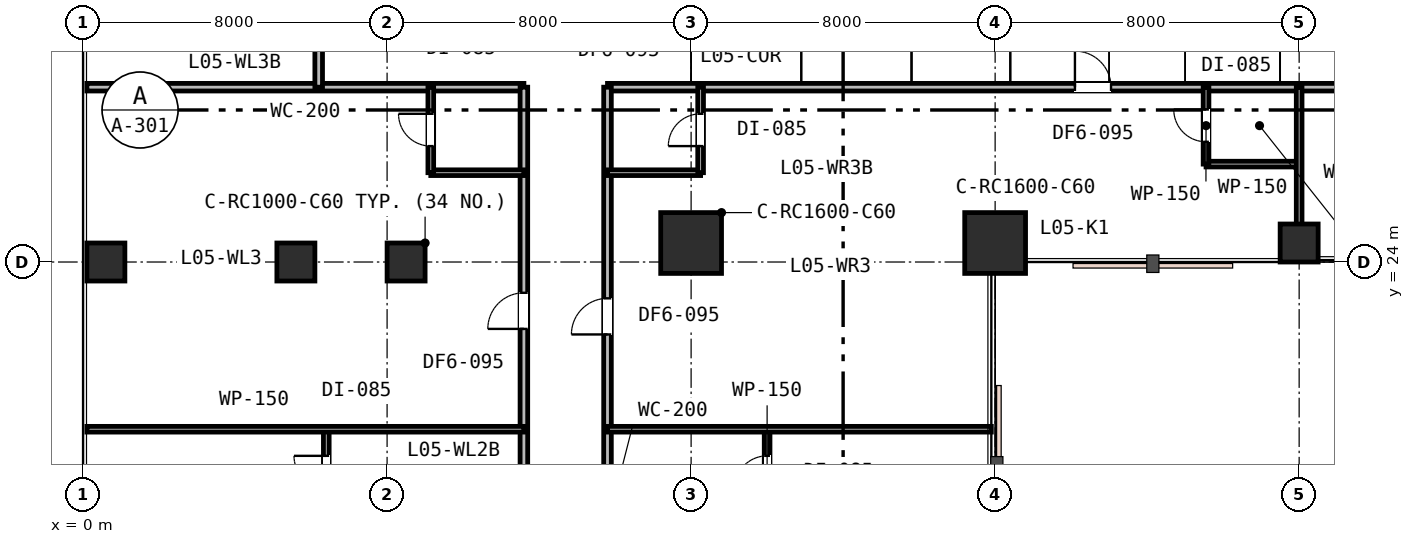
"""IFC4 building model, lengths in metres.
Left out: names, types, materials, properties, quantities, classifications, styles, units other than length and angle.
Written with IfcOpenShell. Run it as: python <this file> out.ifc"""

import sys

from ifc_helpers import new_model, si_unit, direction, frame, frame_2d, origin, origin_2d, place, context, subcontext, project, spatial, rectangle, extrude, element, fill, save


model = new_model("IFC4")
c1 = context("Model", 3, precision=1e-05, world=origin(), true_north=direction((0.0, 1.0)))
c2 = subcontext(c1, "Body", "Model", "MODEL_VIEW")
j1 = project(units=[si_unit("LENGTHUNIT", "METRE"), si_unit("PLANEANGLEUNIT", "RADIAN")], contexts=[c1])
p1 = place(None, origin())
s1 = spatial("IfcSite", under=j1, at=p1, CompositionType="ELEMENT")
p2 = place(p1, origin())
s2 = spatial("IfcBuilding", under=s1, at=p2, CompositionType="ELEMENT")
p3 = place(p2, frame((0.0, 0.0, 25.8)))
s3 = spatial("IfcBuildingStorey", under=s2, at=p3, CompositionType="ELEMENT", Elevation=25.8)
p4 = place(p3, frame((8.5, 24.0, 0.0), z_axis=(0.0, 0.0, 1.0), x_axis=(1.0, 0.0, 0.0)))
e1 = element("IfcColumn", 1, at=p4, inside=s3, PredefinedType="COLUMN", context=c2, shape_type="SweptSolid", body=[
    extrude(rectangle(XDim=1.0, YDim=1.0, at=origin_2d()), origin(), (0.0, 0.0, 1.0), 3.6),
])
for number, where, z_axis, x_axis in (
    (2, (16.0, 24.5, 0.0), (0.0, 0.0, 1.0), (1.0, 0.0, 0.0)),
    (3, (24.0, 24.5, 0.0), (0.0, 0.0, 1.0), (1.0, 0.0, 0.0)),
):
    element("IfcColumn", number, at=place(p3, frame(where, z_axis=z_axis, x_axis=x_axis)), inside=s3, PredefinedType="COLUMN", context=c2, shape_type="SweptSolid", body=[
        extrude(rectangle(XDim=1.6, YDim=1.6, at=origin_2d()), origin(), (0.0, 0.0, 1.0), 3.6),
    ])
for number, where, z_axis, x_axis in (
    (4, (32.0, 24.5, 0.0), (0.0, 0.0, 1.0), (1.0, 0.0, 0.0)),
    (5, (5.6, 24.0, 0.0), (0.0, 0.0, 1.0), (1.0, 0.0, 0.0)),
    (6, (0.6, 24.0, 0.0), (0.0, 0.0, 1.0), (1.0, 0.0, 0.0)),
):
    element("IfcColumn", number, at=place(p3, frame(where, z_axis=z_axis, x_axis=x_axis)), inside=s3, PredefinedType="COLUMN", context=c2, shape_type="SweptSolid", body=[
        extrude(rectangle(XDim=1.0, YDim=1.0, at=origin_2d()), origin(), (0.0, 0.0, 1.0), 3.6),
    ])
p5 = place(p3, frame((0.1, 28.6, 0.0), z_axis=(0.0, 0.0, 1.0), x_axis=(1.0, 0.0, 0.0)))
e7 = element("IfcWall", 7, at=p5, inside=s3, PredefinedType="PARTITIONING", context=c2, shape_type="SweptSolid", body=[
    extrude(rectangle(XDim=11.5, YDim=0.2, at=frame_2d((5.75, 0.0))), origin(), (0.0, 0.0, 1.0), 2.68),
])
p6 = place(p3, frame((13.8, 28.6, 0.0), z_axis=(0.0, 0.0, 1.0), x_axis=(1.0, 0.0, 0.0)))
e8 = element("IfcWall", 8, at=p6, inside=s3, PredefinedType="PARTITIONING", context=c2, shape_type="SweptSolid", body=[
    extrude(rectangle(XDim=36.6, YDim=0.2, at=frame_2d((18.3, 0.0))), origin(), (0.0, 0.0, 1.0), 2.68),
])
p7 = place(p6, frame((12.3, 0.0, 0.0)))
e9 = element("IfcOpeningElement", 9, at=p7, cuts=e8, PredefinedType="OPENING", context=c2, shape_type="SweptSolid", body=[
    extrude(rectangle(XDim=0.95, YDim=2.15, at=frame_2d((0.475, 1.075))), frame((0.0, 0.11, 0.0), z_axis=(0.0, -1.0, 0.0), x_axis=(1.0, 0.0, 0.0)), (0.0, 0.0, 1.0), 0.22),
])
p8 = place(p6, frame((20.075, 0.0, 0.0)))
e10 = element("IfcOpeningElement", 10, at=p8, cuts=e8, PredefinedType="OPENING", context=c2, shape_type="SweptSolid", body=[
    extrude(rectangle(XDim=0.95, YDim=2.15, at=frame_2d((0.475, 1.075))), frame((0.0, 0.11, 0.0), z_axis=(0.0, -1.0, 0.0), x_axis=(1.0, 0.0, 0.0)), (0.0, 0.0, 1.0), 0.22),
])
p9 = place(p6, frame((26.829, 0.0, 0.0)))
e11 = element("IfcOpeningElement", 11, at=p9, cuts=e8, PredefinedType="OPENING", context=c2, shape_type="SweptSolid", body=[
    extrude(rectangle(XDim=0.95, YDim=2.15, at=frame_2d((0.475, 1.075))), frame((0.0, 0.11, 0.0), z_axis=(0.0, -1.0, 0.0), x_axis=(1.0, 0.0, 0.0)), (0.0, 0.0, 1.0), 0.22),
])
p10 = place(p6, frame((32.669, 0.0, 0.0)))
e12 = element("IfcOpeningElement", 12, at=p10, cuts=e8, PredefinedType="OPENING", context=c2, shape_type="SweptSolid", body=[
    extrude(rectangle(XDim=0.95, YDim=2.15, at=frame_2d((0.475, 1.075))), frame((0.0, 0.11, 0.0), z_axis=(0.0, -1.0, 0.0), x_axis=(1.0, 0.0, 0.0)), (0.0, 0.0, 1.0), 0.22),
])
p11 = place(p3, frame((6.2, 28.6, 0.0), z_axis=(0.0, 0.0, 1.0), x_axis=(0.0, 1.0, 0.0)))
e13 = element("IfcWall", 13, at=p11, inside=s3, PredefinedType="PARTITIONING", context=c2, shape_type="SweptSolid", body=[
    extrude(rectangle(XDim=12.4, YDim=0.2, at=frame_2d((6.2, 0.0))), origin(), (0.0, 0.0, 1.0), 2.68),
])
p12 = place(p11, frame((3.725, 0.0, 0.0)))
e14 = element("IfcOpeningElement", 14, at=p12, cuts=e13, PredefinedType="OPENING", context=c2, shape_type="SweptSolid", body=[
    extrude(rectangle(XDim=0.95, YDim=2.15, at=frame_2d((0.475, 1.075))), frame((0.0, 0.11, 0.0), z_axis=(0.0, -1.0, 0.0), x_axis=(1.0, 0.0, 0.0)), (0.0, 0.0, 1.0), 0.22),
])
p13 = place(p11, frame((8.91, 0.0, 0.0)))
e15 = element("IfcOpeningElement", 15, at=p13, cuts=e13, PredefinedType="OPENING", context=c2, shape_type="SweptSolid", body=[
    extrude(rectangle(XDim=0.95, YDim=2.15, at=frame_2d((0.475, 1.075))), frame((0.0, 0.11, 0.0), z_axis=(0.0, -1.0, 0.0), x_axis=(1.0, 0.0, 0.0)), (0.0, 0.0, 1.0), 0.22),
])
p14 = place(p3, frame((29.55, 26.576, 0.0), z_axis=(0.0, 0.0, 1.0), x_axis=(1.0, 0.0, 0.0)))
e16 = element("IfcWall", 16, at=p14, inside=s3, PredefinedType="PARTITIONING", context=c2, shape_type="SweptSolid", body=[
    extrude(rectangle(XDim=2.45, YDim=0.15, at=frame_2d((1.225, 0.0))), origin(), (0.0, 0.0, 1.0), 3.33),
])
p15 = place(p3, frame((29.55, 26.576, 0.0), z_axis=(0.0, 0.0, 1.0), x_axis=(0.0, 1.0, 0.0)))
e17 = element("IfcWall", 17, at=p15, inside=s3, PredefinedType="PARTITIONING", context=c2, shape_type="SweptSolid", body=[
    extrude(rectangle(XDim=2.024, YDim=0.15, at=frame_2d((1.012, 0.0))), origin(), (0.0, 0.0, 1.0), 3.33),
])
p16 = place(p15, frame((0.587, 0.0, 0.0)))
e18 = element("IfcOpeningElement", 18, at=p16, cuts=e17, PredefinedType="OPENING", context=c2, shape_type="SweptSolid", body=[
    extrude(rectangle(XDim=0.85, YDim=2.15, at=frame_2d((0.425, 1.075))), frame((0.0, 0.085, 0.0), z_axis=(0.0, -1.0, 0.0), x_axis=(1.0, 0.0, 0.0)), (0.0, 0.0, 1.0), 0.17),
])
p17 = place(p3, frame((32.0, 28.6, 0.0), z_axis=(0.0, 0.0, 1.0), x_axis=(0.0, -1.0, 0.0)))
e19 = element("IfcWall", 19, at=p17, inside=s3, PredefinedType="PARTITIONING", context=c2, shape_type="SweptSolid", body=[
    extrude(rectangle(XDim=4.5, YDim=0.15, at=frame_2d((2.25, 0.0))), origin(), (0.0, 0.0, 1.0), 2.87),
])
p18 = place(p3, frame((11.6, 5.6, 0.0), z_axis=(0.0, 0.0, 1.0), x_axis=(0.0, 1.0, 0.0)))
e20 = element("IfcWall", 20, at=p18, inside=s3, PredefinedType="PARTITIONING", context=c2, shape_type="SweptSolid", body=[
    extrude(rectangle(XDim=23.0, YDim=0.2, at=frame_2d((11.5, 0.0))), origin(), (0.0, 0.0, 1.0), 2.68),
])
p19 = place(p18, frame((2.19, 0.0, 0.0)))
e21 = element("IfcOpeningElement", 21, at=p19, cuts=e20, PredefinedType="OPENING", context=c2, shape_type="SweptSolid", body=[
    extrude(rectangle(XDim=0.95, YDim=2.15, at=frame_2d((0.475, 1.075))), frame((0.0, 0.11, 0.0), z_axis=(0.0, -1.0, 0.0), x_axis=(1.0, 0.0, 0.0)), (0.0, 0.0, 1.0), 0.22),
])
p20 = place(p18, frame((9.29, 0.0, 0.0)))
e22 = element("IfcOpeningElement", 22, at=p20, cuts=e20, PredefinedType="OPENING", context=c2, shape_type="SweptSolid", body=[
    extrude(rectangle(XDim=0.95, YDim=2.15, at=frame_2d((0.475, 1.075))), frame((0.0, 0.11, 0.0), z_axis=(0.0, -1.0, 0.0), x_axis=(1.0, 0.0, 0.0)), (0.0, 0.0, 1.0), 0.22),
])
p21 = place(p18, frame((16.64, 0.0, 0.0)))
e23 = element("IfcOpeningElement", 23, at=p21, cuts=e20, PredefinedType="OPENING", context=c2, shape_type="SweptSolid", body=[
    extrude(rectangle(XDim=0.95, YDim=2.15, at=frame_2d((0.475, 1.075))), frame((0.0, 0.11, 0.0), z_axis=(0.0, -1.0, 0.0), x_axis=(1.0, 0.0, 0.0)), (0.0, 0.0, 1.0), 0.22),
])
p22 = place(p3, frame((13.8, 5.6, 0.0), z_axis=(0.0, 0.0, 1.0), x_axis=(0.0, 1.0, 0.0)))
e24 = element("IfcWall", 24, at=p22, inside=s3, PredefinedType="PARTITIONING", context=c2, shape_type="SweptSolid", body=[
    extrude(rectangle(XDim=23.0, YDim=0.2, at=frame_2d((11.5, 0.0))), origin(), (0.0, 0.0, 1.0), 2.68),
])
p23 = place(p22, frame((0.752, 0.0, 0.0)))
e25 = element("IfcOpeningElement", 25, at=p23, cuts=e24, PredefinedType="OPENING", context=c2, shape_type="SweptSolid", body=[
    extrude(rectangle(XDim=0.95, YDim=2.15, at=frame_2d((0.475, 1.075))), frame((0.0, 0.11, 0.0), z_axis=(0.0, -1.0, 0.0), x_axis=(1.0, 0.0, 0.0)), (0.0, 0.0, 1.0), 0.22),
])
p24 = place(p22, frame((9.29, 0.0, 0.0)))
e26 = element("IfcOpeningElement", 26, at=p24, cuts=e24, PredefinedType="OPENING", context=c2, shape_type="SweptSolid", body=[
    extrude(rectangle(XDim=0.95, YDim=2.15, at=frame_2d((0.475, 1.075))), frame((0.0, 0.11, 0.0), z_axis=(0.0, -1.0, 0.0), x_axis=(1.0, 0.0, 0.0)), (0.0, 0.0, 1.0), 0.22),
])
p25 = place(p22, frame((16.494, 0.0, 0.0)))
e27 = element("IfcOpeningElement", 27, at=p25, cuts=e24, PredefinedType="OPENING", context=c2, shape_type="SweptSolid", body=[
    extrude(rectangle(XDim=0.95, YDim=2.15, at=frame_2d((0.475, 1.075))), frame((0.0, 0.11, 0.0), z_axis=(0.0, -1.0, 0.0), x_axis=(1.0, 0.0, 0.0)), (0.0, 0.0, 1.0), 0.22),
])
p26 = place(p3, frame((6.4, 17.35, 0.0), z_axis=(0.0, 0.0, 1.0), x_axis=(0.0, 1.0, 0.0)))
e28 = element("IfcWall", 28, at=p26, inside=s3, PredefinedType="PARTITIONING", context=c2, shape_type="SweptSolid", body=[
    extrude(rectangle(XDim=2.25, YDim=0.15, at=frame_2d((1.125, 0.0))), origin(), (0.0, 0.0, 1.0), 2.68),
])
p27 = place(p26, frame((0.7, 0.0, 0.0)))
e29 = element("IfcOpeningElement", 29, at=p27, cuts=e28, PredefinedType="OPENING", context=c2, shape_type="SweptSolid", body=[
    extrude(rectangle(XDim=0.85, YDim=2.15, at=frame_2d((0.425, 1.075))), frame((0.0, 0.085, 0.0), z_axis=(0.0, -1.0, 0.0), x_axis=(1.0, 0.0, 0.0)), (0.0, 0.0, 1.0), 0.17),
])
p28 = place(p3, frame((0.1, 19.6, 0.0), z_axis=(0.0, 0.0, 1.0), x_axis=(1.0, 0.0, 0.0)))
e30 = element("IfcWall", 30, at=p28, inside=s3, PredefinedType="PARTITIONING", context=c2, shape_type="SweptSolid", body=[
    extrude(rectangle(XDim=11.5, YDim=0.15, at=frame_2d((5.75, 0.0))), origin(), (0.0, 0.0, 1.0), 2.68),
])
p29 = place(p3, frame((18.0, 17.35, 0.0), z_axis=(0.0, 0.0, 1.0), x_axis=(0.0, 1.0, 0.0)))
e31 = element("IfcWall", 31, at=p29, inside=s3, PredefinedType="PARTITIONING", context=c2, shape_type="SweptSolid", body=[
    extrude(rectangle(XDim=2.25, YDim=0.15, at=frame_2d((1.125, 0.0))), origin(), (0.0, 0.0, 1.0), 2.68),
])
p30 = place(p29, frame((0.7, 0.0, 0.0)))
e32 = element("IfcOpeningElement", 32, at=p30, cuts=e31, PredefinedType="OPENING", context=c2, shape_type="SweptSolid", body=[
    extrude(rectangle(XDim=0.85, YDim=2.15, at=frame_2d((0.425, 1.075))), frame((0.0, 0.085, 0.0), z_axis=(0.0, -1.0, 0.0), x_axis=(1.0, 0.0, 0.0)), (0.0, 0.0, 1.0), 0.17),
])
p31 = place(p3, frame((13.8, 19.6, 0.0), z_axis=(0.0, 0.0, 1.0), x_axis=(1.0, 0.0, 0.0)))
e33 = element("IfcWall", 33, at=p31, inside=s3, PredefinedType="PARTITIONING", context=c2, shape_type="SweptSolid", body=[
    extrude(rectangle(XDim=10.1, YDim=0.15, at=frame_2d((5.05, 0.0))), origin(), (0.0, 0.0, 1.0), 2.68),
])
p32 = place(p3, frame((9.15, 26.35, 0.0), z_axis=(0.0, 0.0, 1.0), x_axis=(1.0, 0.0, 0.0)))
e34 = element("IfcWall", 34, at=p32, inside=s3, PredefinedType="PARTITIONING", context=c2, shape_type="SweptSolid", body=[
    extrude(rectangle(XDim=2.45, YDim=0.15, at=frame_2d((1.225, 0.0))), origin(), (0.0, 0.0, 1.0), 3.33),
])
p33 = place(p3, frame((9.15, 26.35, 0.0), z_axis=(0.0, 0.0, 1.0), x_axis=(0.0, 1.0, 0.0)))
e35 = element("IfcWall", 35, at=p33, inside=s3, PredefinedType="PARTITIONING", context=c2, shape_type="SweptSolid", body=[
    extrude(rectangle(XDim=2.25, YDim=0.15, at=frame_2d((1.125, 0.0))), origin(), (0.0, 0.0, 1.0), 3.33),
])
p34 = place(p33, frame((0.7, 0.0, 0.0)))
e36 = element("IfcOpeningElement", 36, at=p34, cuts=e35, PredefinedType="OPENING", context=c2, shape_type="SweptSolid", body=[
    extrude(rectangle(XDim=0.85, YDim=2.15, at=frame_2d((0.425, 1.075))), frame((0.0, 0.085, 0.0), z_axis=(0.0, -1.0, 0.0), x_axis=(1.0, 0.0, 0.0)), (0.0, 0.0, 1.0), 0.17),
])
p35 = place(p3, frame((13.8, 26.35, 0.0), z_axis=(0.0, 0.0, 1.0), x_axis=(1.0, 0.0, 0.0)))
e37 = element("IfcWall", 37, at=p35, inside=s3, PredefinedType="PARTITIONING", context=c2, shape_type="SweptSolid", body=[
    extrude(rectangle(XDim=2.45, YDim=0.15, at=frame_2d((1.225, 0.0))), origin(), (0.0, 0.0, 1.0), 2.68),
])
p36 = place(p3, frame((16.25, 26.35, 0.0), z_axis=(0.0, 0.0, 1.0), x_axis=(0.0, 1.0, 0.0)))
e38 = element("IfcWall", 38, at=p36, inside=s3, PredefinedType="PARTITIONING", context=c2, shape_type="SweptSolid", body=[
    extrude(rectangle(XDim=2.25, YDim=0.15, at=frame_2d((1.125, 0.0))), origin(), (0.0, 0.0, 1.0), 2.68),
])
p37 = place(p36, frame((0.7, 0.0, 0.0)))
e39 = element("IfcOpeningElement", 39, at=p37, cuts=e38, PredefinedType="OPENING", context=c2, shape_type="SweptSolid", body=[
    extrude(rectangle(XDim=0.85, YDim=2.15, at=frame_2d((0.425, 1.075))), frame((0.0, 0.085, 0.0), z_axis=(0.0, -1.0, 0.0), x_axis=(1.0, 0.0, 0.0)), (0.0, 0.0, 1.0), 0.17),
])
p38 = place(p7, origin())
e40 = element("IfcDoor", 40, at=p38, inside=s3, OperationType="SINGLE_SWING_LEFT", PredefinedType="DOOR", context=c2, shape_type="SweptSolid", body=[
    extrude(rectangle(XDim=0.95, YDim=2.15, at=frame_2d((0.475, 1.075))), frame((0.0, 0.025, 0.0), z_axis=(0.0, -1.0, 0.0), x_axis=(1.0, 0.0, 0.0)), (0.0, 0.0, 1.0), 0.05),
])
fill(e9, e40)
p39 = place(p16, origin())
e41 = element("IfcDoor", 41, at=p39, inside=s3, OperationType="SINGLE_SWING_RIGHT", PredefinedType="DOOR", context=c2, shape_type="SweptSolid", body=[
    extrude(rectangle(XDim=0.85, YDim=2.15, at=frame_2d((0.425, 1.075))), frame((0.0, 0.025, 0.0), z_axis=(0.0, -1.0, 0.0), x_axis=(1.0, 0.0, 0.0)), (0.0, 0.0, 1.0), 0.05),
])
fill(e18, e41)
p40 = place(p27, origin())
e42 = element("IfcDoor", 42, at=p40, inside=s3, OperationType="SINGLE_SWING_RIGHT", PredefinedType="DOOR", context=c2, shape_type="SweptSolid", body=[
    extrude(rectangle(XDim=0.85, YDim=2.15, at=frame_2d((0.425, 1.075))), frame((0.0, 0.025, 0.0), z_axis=(0.0, -1.0, 0.0), x_axis=(1.0, 0.0, 0.0)), (0.0, 0.0, 1.0), 0.05),
])
fill(e29, e42)
p41 = place(p30, origin())
e43 = element("IfcDoor", 43, at=p41, inside=s3, OperationType="SINGLE_SWING_LEFT", PredefinedType="DOOR", context=c2, shape_type="SweptSolid", body=[
    extrude(rectangle(XDim=0.85, YDim=2.15, at=frame_2d((0.425, 1.075))), frame((0.0, 0.025, 0.0), z_axis=(0.0, -1.0, 0.0), x_axis=(1.0, 0.0, 0.0)), (0.0, 0.0, 1.0), 0.05),
])
fill(e32, e43)
p42 = place(p21, origin())
e44 = element("IfcDoor", 44, at=p42, inside=s3, OperationType="SINGLE_SWING_LEFT", PredefinedType="DOOR", context=c2, shape_type="SweptSolid", body=[
    extrude(rectangle(XDim=0.95, YDim=2.15, at=frame_2d((0.475, 1.075))), frame((0.0, 0.025, 0.0), z_axis=(0.0, -1.0, 0.0), x_axis=(1.0, 0.0, 0.0)), (0.0, 0.0, 1.0), 0.05),
])
fill(e23, e44)
p43 = place(p34, origin())
e45 = element("IfcDoor", 45, at=p43, inside=s3, OperationType="SINGLE_SWING_RIGHT", PredefinedType="DOOR", context=c2, shape_type="SweptSolid", body=[
    extrude(rectangle(XDim=0.85, YDim=2.15, at=frame_2d((0.425, 1.075))), frame((0.0, 0.025, 0.0), z_axis=(0.0, -1.0, 0.0), x_axis=(1.0, 0.0, 0.0)), (0.0, 0.0, 1.0), 0.05),
])
fill(e36, e45)
p44 = place(p25, origin())
e46 = element("IfcDoor", 46, at=p44, inside=s3, OperationType="SINGLE_SWING_LEFT", PredefinedType="DOOR", context=c2, shape_type="SweptSolid", body=[
    extrude(rectangle(XDim=0.95, YDim=2.15, at=frame_2d((0.475, 1.075))), frame((0.0, 0.025, 0.0), z_axis=(0.0, -1.0, 0.0), x_axis=(1.0, 0.0, 0.0)), (0.0, 0.0, 1.0), 0.05),
])
fill(e27, e46)
p45 = place(p37, origin())
e47 = element("IfcDoor", 47, at=p45, inside=s3, OperationType="SINGLE_SWING_LEFT", PredefinedType="DOOR", context=c2, shape_type="SweptSolid", body=[
    extrude(rectangle(XDim=0.85, YDim=2.15, at=frame_2d((0.425, 1.075))), frame((0.0, 0.025, 0.0), z_axis=(0.0, -1.0, 0.0), x_axis=(1.0, 0.0, 0.0)), (0.0, 0.0, 1.0), 0.05),
])
fill(e39, e47)
save(model, sys.argv[1])
